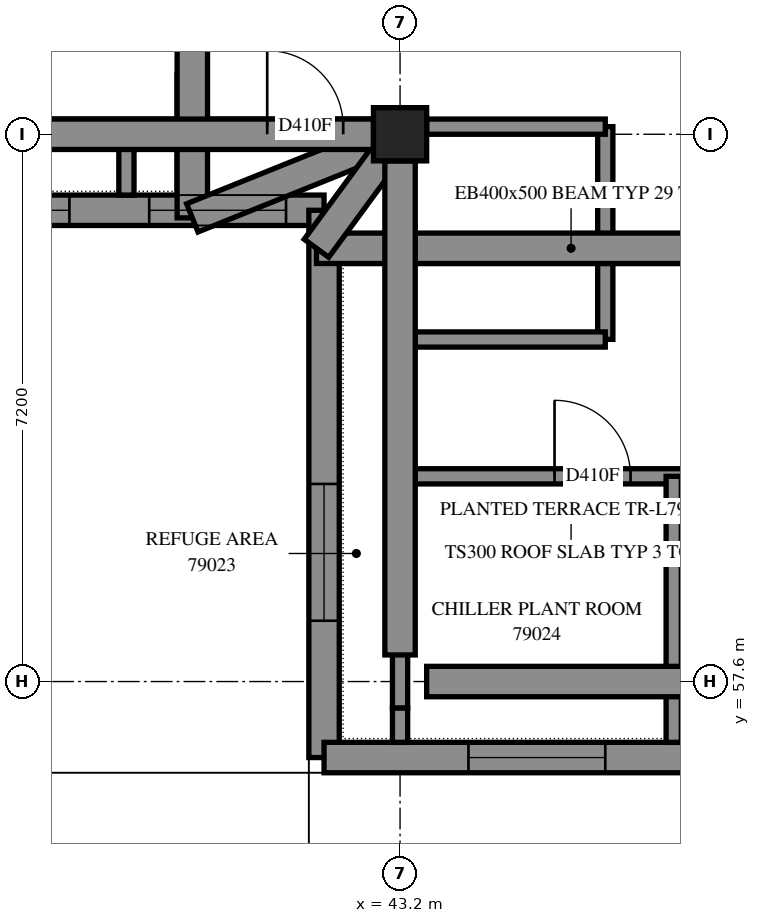
"""IFC4 building model, lengths in metres.
Left out: names, types, materials, properties, quantities, classifications, styles, units other than length and angle.
Written with IfcOpenShell. Run it as: python <this file> out.ifc"""

import sys

from ifc_helpers import new_model, si_unit, direction, frame, frame_2d, origin, origin_2d, place, context, subcontext, project, spatial, polyline, rectangle, outline, extrude, element, fill, save


model = new_model("IFC4")
c1 = context("Model", 3, precision=1e-05, world=origin(), true_north=direction((0.0, 1.0)))
c2 = subcontext(c1, "Body", "Model", "MODEL_VIEW")
j1 = project(units=[si_unit("LENGTHUNIT", "METRE"), si_unit("PLANEANGLEUNIT", "RADIAN")], contexts=[c1])
p1 = place(None, origin())
s1 = spatial("IfcSite", under=j1, at=p1, CompositionType="ELEMENT")
p2 = place(p1, origin())
s2 = spatial("IfcBuilding", under=s1, at=p2, CompositionType="ELEMENT")
p3 = place(p2, frame((0.0, 0.0, 290.6)))
s3 = spatial("IfcBuildingStorey", under=s2, at=p3, CompositionType="ELEMENT", Elevation=290.6)
p4 = place(p3, frame((43.2, 64.8, 0.0), z_axis=(0.0, 0.0, 1.0), x_axis=(1.0, 0.0, 0.0)))
e1 = element("IfcColumn", 1, at=p4, inside=s3, PredefinedType="COLUMN", context=c2, shape_type="SweptSolid", body=[
    extrude(rectangle(XDim=0.7, YDim=0.7, at=origin_2d()), origin(), (0.0, 0.0, 1.0), 3.5),
])
p5 = place(p3, frame((33.767, 63.8, 0.0), z_axis=(0.0, 0.0, 1.0), x_axis=(1.0, 0.0, 0.0)))
e2 = element("IfcWall", 2, at=p5, inside=s3, PredefinedType="SOLIDWALL", context=c2, shape_type="SweptSolid", body=[
    extrude(outline(polyline([(-0.2, -0.2), (8.233, -0.2), (8.633, 0.2), (0.2, 0.2), (-0.2, -0.2)])), origin(), (0.0, 0.0, 1.0), 3.5),
])
p6 = place(p5, frame((3.283, 0.0, 0.7)))
e3 = element("IfcOpeningElement", 3, at=p6, cuts=e2, PredefinedType="OPENING", context=c2, shape_type="SweptSolid", body=[
    extrude(rectangle(XDim=1.8, YDim=2.2, at=frame_2d((0.9, 1.1))), frame((0.0, 0.21, 0.0), z_axis=(0.0, -1.0, 0.0), x_axis=(1.0, 0.0, 0.0)), (0.0, 0.0, 1.0), 0.42),
])
p7 = place(p5, frame((6.133, 0.0, 0.7)))
e4 = element("IfcOpeningElement", 4, at=p7, cuts=e2, PredefinedType="OPENING", context=c2, shape_type="SweptSolid", body=[
    extrude(rectangle(XDim=1.8, YDim=2.2, at=frame_2d((0.9, 1.1))), frame((0.0, 0.21, 0.0), z_axis=(0.0, -1.0, 0.0), x_axis=(1.0, 0.0, 0.0)), (0.0, 0.0, 1.0), 0.42),
])
p8 = place(p3, frame((42.2, 63.8, 0.0), z_axis=(0.0, 0.0, 1.0), x_axis=(0.0, -1.0, 0.0)))
e5 = element("IfcWall", 5, at=p8, inside=s3, PredefinedType="SOLIDWALL", context=c2, shape_type="SweptSolid", body=[
    extrude(outline(polyline([(0.2, -0.2), (7.4, -0.2), (7.0, 0.2), (-0.2, 0.2), (0.2, -0.2)])), origin(), (0.0, 0.0, 1.0), 3.5),
])
p9 = place(p8, frame((3.6, 0.0, 0.7)))
e6 = element("IfcOpeningElement", 6, at=p9, cuts=e5, PredefinedType="OPENING", context=c2, shape_type="SweptSolid", body=[
    extrude(rectangle(XDim=1.8, YDim=2.2, at=frame_2d((0.9, 1.1))), frame((0.0, 0.21, 0.0), z_axis=(0.0, -1.0, 0.0), x_axis=(1.0, 0.0, 0.0)), (0.0, 0.0, 1.0), 0.42),
])
p10 = place(p3, frame((42.2, 56.6, 0.0), z_axis=(0.0, 0.0, 1.0), x_axis=(1.0, 0.0, 0.0)))
e7 = element("IfcWall", 7, at=p10, inside=s3, PredefinedType="SOLIDWALL", context=c2, shape_type="SweptSolid", body=[
    extrude(outline(polyline([(-0.2, -0.2), (7.0, -0.2), (7.4, 0.2), (0.2, 0.2), (-0.2, -0.2)])), origin(), (0.0, 0.0, 1.0), 3.5),
])
p11 = place(p10, frame((1.9, 0.0, 0.7)))
e8 = element("IfcOpeningElement", 8, at=p11, cuts=e7, PredefinedType="OPENING", context=c2, shape_type="SweptSolid", body=[
    extrude(rectangle(XDim=1.8, YDim=2.2, at=frame_2d((0.9, 1.1))), frame((0.0, 0.21, 0.0), z_axis=(0.0, -1.0, 0.0), x_axis=(1.0, 0.0, 0.0)), (0.0, 0.0, 1.0), 0.42),
])
p12 = place(p10, frame((4.9, 0.0, 0.7)))
e9 = element("IfcOpeningElement", 9, at=p12, cuts=e7, PredefinedType="OPENING", context=c2, shape_type="SweptSolid", body=[
    extrude(rectangle(XDim=1.8, YDim=2.2, at=frame_2d((0.9, 1.1))), frame((0.0, 0.21, 0.0), z_axis=(0.0, -1.0, 0.0), x_axis=(1.0, 0.0, 0.0)), (0.0, 0.0, 1.0), 0.42),
])
p13 = place(p3, frame((43.2, 60.3, 0.0), z_axis=(0.0, 0.0, 1.0), x_axis=(1.0, 0.0, 0.0)))
e10 = element("IfcWall", 10, at=p13, inside=s3, PredefinedType="PARTITIONING", context=c2, shape_type="SweptSolid", body=[
    extrude(rectangle(XDim=12.2, YDim=0.2, at=frame_2d((6.1, 0.0))), origin(), (0.0, 0.0, 1.0), 3.5),
])
p14 = place(p13, frame((2.033, 0.0, 0.0)))
e11 = element("IfcOpeningElement", 11, at=p14, cuts=e10, PredefinedType="OPENING", context=c2, shape_type="SweptSolid", body=[
    extrude(rectangle(XDim=1.0, YDim=2.1, at=frame_2d((0.5, 1.05))), frame((0.0, 0.11, 0.0), z_axis=(0.0, -1.0, 0.0), x_axis=(1.0, 0.0, 0.0)), (0.0, 0.0, 1.0), 0.22),
])
p15 = place(p13, frame((4.107, 0.0, 0.0)))
e12 = element("IfcOpeningElement", 12, at=p15, cuts=e10, PredefinedType="OPENING", context=c2, shape_type="SweptSolid", body=[
    extrude(rectangle(XDim=1.0, YDim=2.1, at=frame_2d((0.5, 1.05))), frame((0.0, 0.11, 0.0), z_axis=(0.0, -1.0, 0.0), x_axis=(1.0, 0.0, 0.0)), (0.0, 0.0, 1.0), 0.22),
])
p16 = place(p13, frame((9.965, 0.0, 0.0)))
e13 = element("IfcOpeningElement", 13, at=p16, cuts=e10, PredefinedType="OPENING", context=c2, shape_type="SweptSolid", body=[
    extrude(rectangle(XDim=1.0, YDim=2.1, at=frame_2d((0.5, 1.05))), frame((0.0, 0.11, 0.0), z_axis=(0.0, -1.0, 0.0), x_axis=(1.0, 0.0, 0.0)), (0.0, 0.0, 1.0), 0.22),
])
p17 = place(p3, frame((36.35, 64.9, 0.0), z_axis=(0.0, 0.0, 1.0), x_axis=(1.0, 0.0, 0.0)))
e14 = element("IfcWall", 14, at=p17, inside=s3, PredefinedType="PARTITIONING", context=c2, shape_type="SweptSolid", body=[
    extrude(rectangle(XDim=7.2, YDim=0.2, at=frame_2d((3.6, 0.0))), origin(), (0.0, 0.0, 1.0), 3.5),
])
p18 = place(p17, frame((1.123, 0.0, 0.0)))
e15 = element("IfcOpeningElement", 15, at=p18, cuts=e14, PredefinedType="OPENING", context=c2, shape_type="SweptSolid", body=[
    extrude(rectangle(XDim=1.0, YDim=2.1, at=frame_2d((0.5, 1.05))), frame((0.0, 0.11, 0.0), z_axis=(0.0, -1.0, 0.0), x_axis=(1.0, 0.0, 0.0)), (0.0, 0.0, 1.0), 0.22),
])
p19 = place(p17, frame((5.102, 0.0, 0.0)))
e16 = element("IfcOpeningElement", 16, at=p19, cuts=e14, PredefinedType="OPENING", context=c2, shape_type="SweptSolid", body=[
    extrude(rectangle(XDim=1.0, YDim=2.1, at=frame_2d((0.5, 1.05))), frame((0.0, 0.11, 0.0), z_axis=(0.0, -1.0, 0.0), x_axis=(1.0, 0.0, 0.0)), (0.0, 0.0, 1.0), 0.22),
])
p20 = place(p3, frame((45.9, 62.102, 0.0), z_axis=(0.0, 0.0, 1.0), x_axis=(0.0, 1.0, 0.0)))
e17 = element("IfcWall", 17, at=p20, inside=s3, PredefinedType="PARTITIONING", context=c2, shape_type="SweptSolid", body=[
    extrude(rectangle(XDim=2.798, YDim=0.2, at=frame_2d((1.399, 0.0))), origin(), (0.0, 0.0, 1.0), 3.5),
])
p21 = place(p3, frame((43.202, 62.1, 0.0), z_axis=(0.0, 0.0, 1.0), x_axis=(1.0, 0.0, 0.0)))
e18 = element("IfcWall", 18, at=p21, inside=s3, PredefinedType="PARTITIONING", context=c2, shape_type="SweptSolid", body=[
    extrude(rectangle(XDim=2.698, YDim=0.2, at=frame_2d((1.349, 0.0))), origin(), (0.0, 0.0, 1.0), 3.5),
])
p22 = place(p3, frame((43.55, 64.9, 0.0), z_axis=(0.0, 0.0, 1.0), x_axis=(1.0, 0.0, 0.0)))
e19 = element("IfcWall", 19, at=p22, inside=s3, PredefinedType="PARTITIONING", context=c2, shape_type="SweptSolid", body=[
    extrude(rectangle(XDim=2.35, YDim=0.2, at=frame_2d((1.175, 0.0))), origin(), (0.0, 0.0, 1.0), 3.0),
])
p23 = place(p3, frame((43.2, 57.25, 0.0), z_axis=(0.0, 0.0, 1.0), x_axis=(0.0, 1.0, 0.0)))
e20 = element("IfcWall", 20, at=p23, inside=s3, PredefinedType="PARTITIONING", context=c2, shape_type="SweptSolid", body=[
    extrude(rectangle(XDim=3.05, YDim=0.2, at=frame_2d((1.525, 0.0))), origin(), (0.0, 0.0, 1.0), 3.5),
])
p24 = place(p3, frame((43.2, 60.3, 0.0), z_axis=(0.0, 0.0, 1.0), x_axis=(0.0, 1.0, 0.0)))
e21 = element("IfcWall", 21, at=p24, inside=s3, PredefinedType="PARTITIONING", context=c2, shape_type="SweptSolid", body=[
    extrude(rectangle(XDim=1.8, YDim=0.2, at=frame_2d((0.9, 0.0))), origin(), (0.0, 0.0, 1.0), 3.5),
])
p25 = place(p3, frame((40.367, 64.0, 0.0), z_axis=(0.0, 0.0, 1.0), x_axis=(0.0, 1.0, 0.0)))
e22 = element("IfcWall", 22, at=p25, inside=s3, PredefinedType="PARAPET", context=c2, shape_type="SweptSolid", body=[
    extrude(outline(polyline([(0.0, -0.1), (1.58, -0.1), (1.58, 0.1), (0.0, 0.1), (0.0, -0.1)])), origin(), (0.0, 0.0, 1.0), 0.25),
])
p26 = place(p3, frame((47.697, 63.2, 0.0), z_axis=(0.0, 0.0, 1.0), x_axis=(-1.0, 0.0, 0.0)))
e23 = element("IfcWall", 23, at=p26, inside=s3, PredefinedType="PARAPET", context=c2, shape_type="SweptSolid", body=[
    extrude(outline(polyline([(0.0, -0.1), (5.297, -0.1), (5.297, 0.1), (0.0, 0.1), (0.0, -0.1)])), origin(), (0.0, 0.0, 1.0), 0.25),
])
p27 = place(p3, frame((46.8, 56.8, 0.0), z_axis=(0.0, 0.0, 1.0), x_axis=(0.0, 1.0, 0.0)))
e24 = element("IfcWall", 24, at=p27, inside=s3, PredefinedType="PARTITIONING", context=c2, shape_type="SweptSolid", body=[
    extrude(outline(polyline([(0.0, -0.1), (3.5, -0.1), (3.5, 0.1), (0.0, 0.1), (0.0, -0.1)])), origin(), (0.0, 0.0, 1.0), 3.5),
])
p28 = place(p3, frame((39.6, 64.0, 0.0), z_axis=(0.0, 0.0, 1.0), x_axis=(0.0, 1.0, 0.0)))
e25 = element("IfcWall", 25, at=p28, inside=s3, PredefinedType="PARTITIONING", context=c2, shape_type="SweptSolid", body=[
    extrude(outline(polyline([(0.0, -0.1), (0.9, -0.1), (0.9, 0.1), (0.0, 0.1), (0.0, -0.1)])), origin(), (0.0, 0.0, 1.0), 3.5),
])
p29 = place(p3, frame((43.2, 56.8, 0.0), z_axis=(0.0, 0.0, 1.0), x_axis=(0.0, 1.0, 0.0)))
e26 = element("IfcWall", 26, at=p29, inside=s3, PredefinedType="PARTITIONING", context=c2, shape_type="SweptSolid", body=[
    extrude(outline(polyline([(0.0, -0.1), (0.45, -0.1), (0.45, 0.1), (0.0, 0.1), (0.0, -0.1)])), origin(), (0.0, 0.0, 1.0), 3.5),
])
p30 = place(p6, origin())
e27 = element("IfcWindow", 27, at=p30, inside=s3, PartitioningType="SINGLE_PANEL", PredefinedType="WINDOW", context=c2, shape_type="SweptSolid", body=[
    extrude(rectangle(XDim=1.8, YDim=2.2, at=frame_2d((0.9, 1.1))), frame((0.0, 0.08, 0.0), z_axis=(0.0, -1.0, 0.0), x_axis=(1.0, 0.0, 0.0)), (0.0, 0.0, 1.0), 0.06),
])
fill(e3, e27)
p31 = place(p7, origin())
e28 = element("IfcWindow", 28, at=p31, inside=s3, PartitioningType="SINGLE_PANEL", PredefinedType="WINDOW", context=c2, shape_type="SweptSolid", body=[
    extrude(rectangle(XDim=1.8, YDim=2.2, at=frame_2d((0.9, 1.1))), frame((0.0, 0.08, 0.0), z_axis=(0.0, -1.0, 0.0), x_axis=(1.0, 0.0, 0.0)), (0.0, 0.0, 1.0), 0.06),
])
fill(e4, e28)
p32 = place(p9, origin())
e29 = element("IfcWindow", 29, at=p32, inside=s3, PartitioningType="SINGLE_PANEL", PredefinedType="WINDOW", context=c2, shape_type="SweptSolid", body=[
    extrude(rectangle(XDim=1.8, YDim=2.2, at=frame_2d((0.9, 1.1))), frame((0.0, 0.08, 0.0), z_axis=(0.0, -1.0, 0.0), x_axis=(1.0, 0.0, 0.0)), (0.0, 0.0, 1.0), 0.06),
])
fill(e6, e29)
p33 = place(p11, origin())
e30 = element("IfcWindow", 30, at=p33, inside=s3, PartitioningType="SINGLE_PANEL", PredefinedType="WINDOW", context=c2, shape_type="SweptSolid", body=[
    extrude(rectangle(XDim=1.8, YDim=2.2, at=frame_2d((0.9, 1.1))), frame((0.0, 0.08, 0.0), z_axis=(0.0, -1.0, 0.0), x_axis=(1.0, 0.0, 0.0)), (0.0, 0.0, 1.0), 0.06),
])
fill(e8, e30)
p34 = place(p19, origin())
e31 = element("IfcDoor", 31, at=p34, inside=s3, OperationType="SINGLE_SWING_RIGHT", PredefinedType="DOOR", context=c2, shape_type="SweptSolid", body=[
    extrude(rectangle(XDim=1.0, YDim=2.1, at=frame_2d((0.5, 1.05))), frame((0.0, 0.025, 0.0), z_axis=(0.0, -1.0, 0.0), x_axis=(1.0, 0.0, 0.0)), (0.0, 0.0, 1.0), 0.05),
])
fill(e16, e31)
p35 = place(p14, origin())
e32 = element("IfcDoor", 32, at=p35, inside=s3, OperationType="SINGLE_SWING_LEFT", PredefinedType="DOOR", context=c2, shape_type="SweptSolid", body=[
    extrude(rectangle(XDim=1.0, YDim=2.1, at=frame_2d((0.5, 1.05))), frame((0.0, 0.025, 0.0), z_axis=(0.0, -1.0, 0.0), x_axis=(1.0, 0.0, 0.0)), (0.0, 0.0, 1.0), 0.05),
])
fill(e11, e32)
save(model, sys.argv[1])
